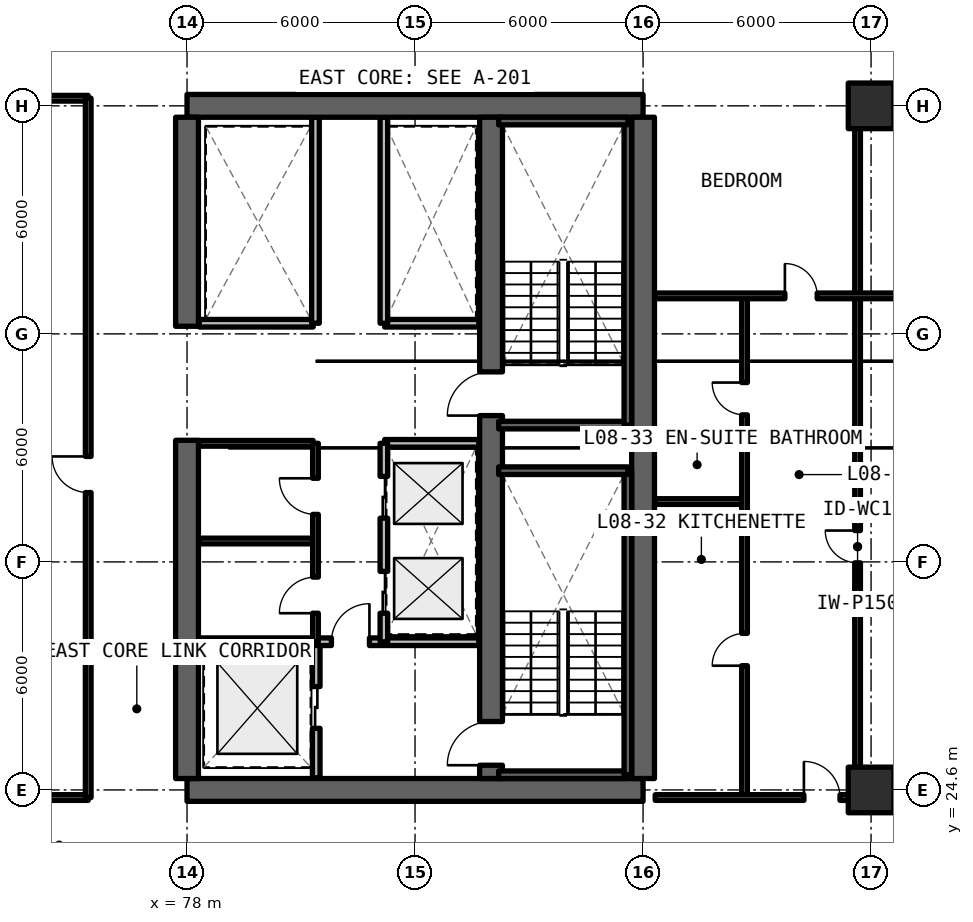
"""IFC4 building model, lengths in metres.
Left out: names, types, materials, properties, quantities, classifications, styles, units other than length and angle.
Written with IfcOpenShell. Run it as: python <this file> out.ifc"""

import sys

from ifc_helpers import new_model, si_unit, direction, frame, frame_2d, origin, origin_2d, place, context, subcontext, project, spatial, rectangle, extrude, element, fill, save


model = new_model("IFC4")
c1 = context("Model", 3, precision=1e-05, world=origin(), true_north=direction((0.0, 1.0)))
c2 = subcontext(c1, "Body", "Model", "MODEL_VIEW")
j1 = project(units=[si_unit("LENGTHUNIT", "METRE"), si_unit("PLANEANGLEUNIT", "RADIAN")], contexts=[c1])
p1 = place(None, origin())
s1 = spatial("IfcSite", under=j1, at=p1, CompositionType="ELEMENT")
p2 = place(p1, origin())
s2 = spatial("IfcBuilding", under=s1, at=p2, CompositionType="ELEMENT")
p3 = place(p2, frame((0.0, 0.0, 32.34)))
s3 = spatial("IfcBuildingStorey", under=s2, at=p3, CompositionType="ELEMENT", Elevation=32.34)
for number, where, z_axis, x_axis in (
    (1, (78.0, 24.6, 0.0), (0.0, 0.0, 1.0), (1.0, 0.0, 0.0)),
    (2, (90.0, 42.6, 0.0), (0.0, 0.0, 1.0), (-1.0, 0.0, 0.0)),
):
    element("IfcWall", number, at=place(p3, frame(where, z_axis=z_axis, x_axis=x_axis)), inside=s3, PredefinedType="SHEAR", context=c2, shape_type="SweptSolid", body=[
        extrude(rectangle(XDim=12.0, YDim=0.6, at=frame_2d((6.0, 0.0))), origin(), (0.0, 0.0, 1.0), 3.3),
    ])
p4 = place(p3, frame((90.0, 24.9, 0.0), z_axis=(0.0, 0.0, 1.0), x_axis=(0.0, 1.0, 0.0)))
e3 = element("IfcWall", 3, at=p4, inside=s3, PredefinedType="SHEAR", context=c2, shape_type="SweptSolid", body=[
    extrude(rectangle(XDim=17.4, YDim=0.6, at=frame_2d((8.7, 0.0))), origin(), (0.0, 0.0, 1.0), 3.3),
])
p5 = place(p3, frame((78.0, 24.9, 0.0), z_axis=(0.0, 0.0, 1.0), x_axis=(0.0, 1.0, 0.0)))
e4 = element("IfcWall", 4, at=p5, inside=s3, PredefinedType="SHEAR", context=c2, shape_type="SweptSolid", body=[
    extrude(rectangle(XDim=8.9, YDim=0.6, at=frame_2d((4.45, 0.0))), origin(), (0.0, 0.0, 1.0), 3.3),
])
p6 = place(p3, frame((78.0, 36.8, 0.0), z_axis=(0.0, 0.0, 1.0), x_axis=(0.0, 1.0, 0.0)))
e5 = element("IfcWall", 5, at=p6, inside=s3, PredefinedType="SHEAR", context=c2, shape_type="SweptSolid", body=[
    extrude(rectangle(XDim=5.5, YDim=0.6, at=frame_2d((2.75, 0.0))), origin(), (0.0, 0.0, 1.0), 3.3),
])
p7 = place(p3, frame((86.0, 24.9, 0.0), z_axis=(0.0, 0.0, 1.0), x_axis=(0.0, 1.0, 0.0)))
e6 = element("IfcWall", 6, at=p7, inside=s3, PredefinedType="SHEAR", context=c2, shape_type="SweptSolid", body=[
    extrude(rectangle(XDim=17.4, YDim=0.6, at=frame_2d((8.7, 0.0))), origin(), (0.0, 0.0, 1.0), 3.3),
])
p8 = place(p7, frame((0.35, 0.0, 0.0)))
e7 = element("IfcOpeningElement", 7, at=p8, cuts=e6, PredefinedType="OPENING", context=c2, shape_type="SweptSolid", body=[
    extrude(rectangle(XDim=1.15, YDim=2.15, at=frame_2d((0.575, 1.075))), frame((0.0, 0.31, 0.0), z_axis=(0.0, -1.0, 0.0), x_axis=(1.0, 0.0, 0.0)), (0.0, 0.0, 1.0), 0.62),
])
p9 = place(p7, frame((9.55, 0.0, 0.0)))
e8 = element("IfcOpeningElement", 8, at=p9, cuts=e6, PredefinedType="OPENING", context=c2, shape_type="SweptSolid", body=[
    extrude(rectangle(XDim=1.15, YDim=2.15, at=frame_2d((0.575, 1.075))), frame((0.0, 0.31, 0.0), z_axis=(0.0, -1.0, 0.0), x_axis=(1.0, 0.0, 0.0)), (0.0, 0.0, 1.0), 0.62),
])
for number, where, z_axis, x_axis in (
    (9, (96.0, 24.6, 0.0), (0.0, 0.0, 1.0), (1.0, 0.0, 0.0)),
    (10, (96.0, 42.6, 0.0), (0.0, 0.0, 1.0), (1.0, 0.0, 0.0)),
):
    element("IfcColumn", number, at=place(p3, frame(where, z_axis=z_axis, x_axis=x_axis)), inside=s3, PredefinedType="COLUMN", context=c2, shape_type="SweptSolid", body=[
        extrude(rectangle(XDim=1.2, YDim=1.2, at=origin_2d()), origin(), (0.0, 0.0, 1.0), 3.3),
    ])
p10 = place(p3, frame((81.4, 24.92, 0.0), z_axis=(0.0, 0.0, 1.0), x_axis=(0.0, 1.0, 0.0)))
e11 = element("IfcWall", 11, at=p10, inside=s3, PredefinedType="SOLIDWALL", context=c2, shape_type="SweptSolid", body=[
    extrude(rectangle(XDim=3.58, YDim=0.2, at=frame_2d((1.79, 0.0))), origin(), (0.0, 0.0, 1.0), 2.35),
])
p11 = place(p10, frame((1.3, 0.0, 0.0)))
e12 = element("IfcOpeningElement", 12, at=p11, cuts=e11, PredefinedType="OPENING", context=c2, shape_type="SweptSolid", body=[
    extrude(rectangle(XDim=1.1, YDim=2.2, at=frame_2d((0.55, 1.1))), frame((0.0, 0.11, 0.0), z_axis=(0.0, -1.0, 0.0), x_axis=(1.0, 0.0, 0.0)), (0.0, 0.0, 1.0), 0.22),
])
p12 = place(p3, frame((78.32, 28.5, 0.0), z_axis=(0.0, 0.0, 1.0), x_axis=(1.0, 0.0, 0.0)))
e13 = element("IfcWall", 13, at=p12, inside=s3, PredefinedType="SOLIDWALL", context=c2, shape_type="SweptSolid", body=[
    extrude(rectangle(XDim=7.36, YDim=0.2, at=frame_2d((3.68, 0.0))), origin(), (0.0, 0.0, 1.0), 2.35),
])
p13 = place(p12, frame((3.48, 0.0, 0.0)))
e14 = element("IfcOpeningElement", 14, at=p13, cuts=e13, PredefinedType="OPENING", context=c2, shape_type="SweptSolid", body=[
    extrude(rectangle(XDim=1.0, YDim=2.15, at=frame_2d((0.5, 1.075))), frame((0.0, 0.11, 0.0), z_axis=(0.0, -1.0, 0.0), x_axis=(1.0, 0.0, 0.0)), (0.0, 0.0, 1.0), 0.22),
])
p14 = place(p3, frame((83.2, 33.72, 0.0), z_axis=(0.0, 0.0, 1.0), x_axis=(1.0, 0.0, 0.0)))
e15 = element("IfcWall", 15, at=p14, inside=s3, PredefinedType="SOLIDWALL", context=c2, shape_type="SweptSolid", body=[
    extrude(rectangle(XDim=2.48, YDim=0.2, at=frame_2d((1.24, 0.0))), origin(), (0.0, 0.0, 1.0), 2.35),
])
p15 = place(p3, frame((83.18, 28.5, 0.0), z_axis=(0.0, 0.0, 1.0), x_axis=(0.0, 1.0, 0.0)))
e16 = element("IfcWall", 16, at=p15, inside=s3, PredefinedType="SOLIDWALL", context=c2, shape_type="SweptSolid", body=[
    extrude(rectangle(XDim=5.22, YDim=0.2, at=frame_2d((2.61, 0.0))), origin(), (0.0, 0.0, 1.0), 2.35),
])
p16 = place(p15, frame((0.75, 0.0, 0.0)))
e17 = element("IfcOpeningElement", 17, at=p16, cuts=e16, PredefinedType="OPENING", context=c2, shape_type="SweptSolid", body=[
    extrude(rectangle(XDim=1.1, YDim=2.2, at=frame_2d((0.55, 1.1))), frame((0.0, 0.11, 0.0), z_axis=(0.0, -1.0, 0.0), x_axis=(1.0, 0.0, 0.0)), (0.0, 0.0, 1.0), 0.22),
])
p17 = place(p15, frame((3.25, 0.0, 0.0)))
e18 = element("IfcOpeningElement", 18, at=p17, cuts=e16, PredefinedType="OPENING", context=c2, shape_type="SweptSolid", body=[
    extrude(rectangle(XDim=1.1, YDim=2.2, at=frame_2d((0.55, 1.1))), frame((0.0, 0.11, 0.0), z_axis=(0.0, -1.0, 0.0), x_axis=(1.0, 0.0, 0.0)), (0.0, 0.0, 1.0), 0.22),
])
for number, where, z_axis, x_axis in (
    (19, (78.32, 31.15, 0.0), (0.0, 0.0, 1.0), (1.0, 0.0, 0.0)),
    (20, (78.32, 33.72, 0.0), (0.0, 0.0, 1.0), (1.0, 0.0, 0.0)),
):
    element("IfcWall", number, at=place(p3, frame(where, z_axis=z_axis, x_axis=x_axis)), inside=s3, PredefinedType="SOLIDWALL", context=c2, shape_type="SweptSolid", body=[
        extrude(rectangle(XDim=3.0, YDim=0.15, at=frame_2d((1.5, 0.0))), origin(), (0.0, 0.0, 1.0), 2.35),
    ])
p18 = place(p3, frame((81.38, 28.5, 0.0), z_axis=(0.0, 0.0, 1.0), x_axis=(0.0, 1.0, 0.0)))
e21 = element("IfcWall", 21, at=p18, inside=s3, PredefinedType="SOLIDWALL", context=c2, shape_type="SweptSolid", body=[
    extrude(rectangle(XDim=5.22, YDim=0.15, at=frame_2d((2.61, 0.0))), origin(), (0.0, 0.0, 1.0), 2.35),
])
p19 = place(p18, frame((0.75, 0.0, 0.0)))
e22 = element("IfcOpeningElement", 22, at=p19, cuts=e21, PredefinedType="OPENING", context=c2, shape_type="SweptSolid", body=[
    extrude(rectangle(XDim=0.95, YDim=2.15, at=frame_2d((0.475, 1.075))), frame((0.0, 0.085, 0.0), z_axis=(0.0, -1.0, 0.0), x_axis=(1.0, 0.0, 0.0)), (0.0, 0.0, 1.0), 0.17),
])
p20 = place(p18, frame((3.35, 0.0, 0.0)))
e23 = element("IfcOpeningElement", 23, at=p20, cuts=e21, PredefinedType="OPENING", context=c2, shape_type="SweptSolid", body=[
    extrude(rectangle(XDim=0.95, YDim=2.15, at=frame_2d((0.475, 1.075))), frame((0.0, 0.085, 0.0), z_axis=(0.0, -1.0, 0.0), x_axis=(1.0, 0.0, 0.0)), (0.0, 0.0, 1.0), 0.17),
])
p21 = place(p3, frame((83.2, 36.88, 0.0), z_axis=(0.0, 0.0, 1.0), x_axis=(1.0, 0.0, 0.0)))
e24 = element("IfcWall", 24, at=p21, inside=s3, PredefinedType="SOLIDWALL", context=c2, shape_type="SweptSolid", body=[
    extrude(rectangle(XDim=2.48, YDim=0.2, at=frame_2d((1.24, 0.0))), origin(), (0.0, 0.0, 1.0), 2.35),
])
p22 = place(p3, frame((83.18, 36.88, 0.0), z_axis=(0.0, 0.0, 1.0), x_axis=(0.0, 1.0, 0.0)))
e25 = element("IfcWall", 25, at=p22, inside=s3, PredefinedType="SOLIDWALL", context=c2, shape_type="SweptSolid", body=[
    extrude(rectangle(XDim=5.42, YDim=0.2, at=frame_2d((2.71, 0.0))), origin(), (0.0, 0.0, 1.0), 2.35),
])
p23 = place(p3, frame((78.32, 36.88, 0.0), z_axis=(0.0, 0.0, 1.0), x_axis=(1.0, 0.0, 0.0)))
e26 = element("IfcWall", 26, at=p23, inside=s3, PredefinedType="SOLIDWALL", context=c2, shape_type="SweptSolid", body=[
    extrude(rectangle(XDim=3.0, YDim=0.2, at=frame_2d((1.5, 0.0))), origin(), (0.0, 0.0, 1.0), 2.35),
])
p24 = place(p3, frame((81.38, 36.88, 0.0), z_axis=(0.0, 0.0, 1.0), x_axis=(0.0, 1.0, 0.0)))
e27 = element("IfcWall", 27, at=p24, inside=s3, PredefinedType="SOLIDWALL", context=c2, shape_type="SweptSolid", body=[
    extrude(rectangle(XDim=5.42, YDim=0.2, at=frame_2d((2.71, 0.0))), origin(), (0.0, 0.0, 1.0), 2.35),
])
for number, where, z_axis, x_axis in (
    (28, (67.15, 24.4, 0.0), (0.0, 0.0, 1.0), (1.0, 0.0, 0.0)),
    (29, (67.15, 42.8, 0.0), (0.0, 0.0, 1.0), (1.0, 0.0, 0.0)),
):
    element("IfcWall", number, at=place(p3, frame(where, z_axis=z_axis, x_axis=x_axis)), inside=s3, PredefinedType="SOLIDWALL", context=c2, shape_type="SweptSolid", body=[
        extrude(rectangle(XDim=8.25, YDim=0.15, at=frame_2d((4.125, 0.0))), origin(), (0.0, 0.0, 1.0), 2.295),
    ])
p25 = place(p3, frame((75.4, 24.4, 0.0), z_axis=(0.0, 0.0, 1.0), x_axis=(0.0, 1.0, 0.0)))
e30 = element("IfcWall", 30, at=p25, inside=s3, PredefinedType="SOLIDWALL", context=c2, shape_type="SweptSolid", body=[
    extrude(rectangle(XDim=18.4, YDim=0.15, at=frame_2d((9.2, 0.0))), origin(), (0.0, 0.0, 1.0), 2.35),
])
p26 = place(p25, frame((8.025, 0.0, 0.0)))
e31 = element("IfcOpeningElement", 31, at=p26, cuts=e30, PredefinedType="OPENING", context=c2, shape_type="SweptSolid", body=[
    extrude(rectangle(XDim=0.95, YDim=2.15, at=frame_2d((0.475, 1.075))), frame((0.0, 0.085, 0.0), z_axis=(0.0, -1.0, 0.0), x_axis=(1.0, 0.0, 0.0)), (0.0, 0.0, 1.0), 0.17),
])
p27 = place(p3, frame((95.645, 24.4, 0.0), z_axis=(0.0, 0.0, 1.0), x_axis=(0.0, 1.0, 0.0)))
e32 = element("IfcWall", 32, at=p27, inside=s3, PredefinedType="PARTITIONING", context=c2, shape_type="SweptSolid", body=[
    extrude(rectangle(XDim=13.2, YDim=0.15, at=frame_2d((6.6, 0.0))), origin(), (0.0, 0.0, 1.0), 2.35),
])
p28 = place(p27, frame((6.175, 0.0, 0.0)))
e33 = element("IfcOpeningElement", 33, at=p28, cuts=e32, PredefinedType="OPENING", context=c2, shape_type="SweptSolid", body=[
    extrude(rectangle(XDim=0.85, YDim=2.1, at=frame_2d((0.425, 1.05))), frame((0.0, 0.085, 0.0), z_axis=(0.0, -1.0, 0.0), x_axis=(1.0, 0.0, 0.0)), (0.0, 0.0, 1.0), 0.17),
])
p29 = place(p3, frame((90.32, 32.188, 0.0), z_axis=(0.0, 0.0, 1.0), x_axis=(1.0, 0.0, 0.0)))
e34 = element("IfcWall", 34, at=p29, inside=s3, PredefinedType="PARTITIONING", context=c2, shape_type="SweptSolid", body=[
    extrude(rectangle(XDim=2.35, YDim=0.15, at=frame_2d((1.175, 0.0))), origin(), (0.0, 0.0, 1.0), 2.35),
])
p30 = place(p3, frame((92.67, 24.4, 0.0), z_axis=(0.0, 0.0, 1.0), x_axis=(0.0, 1.0, 0.0)))
e35 = element("IfcWall", 35, at=p30, inside=s3, PredefinedType="PARTITIONING", context=c2, shape_type="SweptSolid", body=[
    extrude(rectangle(XDim=13.2, YDim=0.15, at=frame_2d((6.6, 0.0))), origin(), (0.0, 0.0, 1.0), 2.35),
])
p31 = place(p30, frame((3.469, 0.0, 0.0)))
e36 = element("IfcOpeningElement", 36, at=p31, cuts=e35, PredefinedType="OPENING", context=c2, shape_type="SweptSolid", body=[
    extrude(rectangle(XDim=0.85, YDim=2.1, at=frame_2d((0.425, 1.05))), frame((0.0, 0.085, 0.0), z_axis=(0.0, -1.0, 0.0), x_axis=(1.0, 0.0, 0.0)), (0.0, 0.0, 1.0), 0.17),
])
p32 = place(p30, frame((10.069, 0.0, 0.0)))
e37 = element("IfcOpeningElement", 37, at=p32, cuts=e35, PredefinedType="OPENING", context=c2, shape_type="SweptSolid", body=[
    extrude(rectangle(XDim=0.85, YDim=2.1, at=frame_2d((0.425, 1.05))), frame((0.0, 0.085, 0.0), z_axis=(0.0, -1.0, 0.0), x_axis=(1.0, 0.0, 0.0)), (0.0, 0.0, 1.0), 0.17),
])
p33 = place(p3, frame((95.645, 37.6, 0.0), z_axis=(0.0, 0.0, 1.0), x_axis=(0.0, 1.0, 0.0)))
e38 = element("IfcWall", 38, at=p33, inside=s3, PredefinedType="PARTITIONING", context=c2, shape_type="SweptSolid", body=[
    extrude(rectangle(XDim=5.2, YDim=0.15, at=frame_2d((2.6, 0.0))), origin(), (0.0, 0.0, 1.0), 2.35),
])
p34 = place(p3, frame((90.32, 37.6, 0.0), z_axis=(0.0, 0.0, 1.0), x_axis=(1.0, 0.0, 0.0)))
e39 = element("IfcWall", 39, at=p34, inside=s3, PredefinedType="PARTITIONING", context=c2, shape_type="SweptSolid", body=[
    extrude(rectangle(XDim=10.24, YDim=0.15, at=frame_2d((5.12, 0.0))), origin(), (0.0, 0.0, 1.0), 2.35),
])
p35 = place(p34, frame((3.412, 0.0, 0.0)))
e40 = element("IfcOpeningElement", 40, at=p35, cuts=e39, PredefinedType="OPENING", context=c2, shape_type="SweptSolid", body=[
    extrude(rectangle(XDim=0.85, YDim=2.1, at=frame_2d((0.425, 1.05))), frame((0.0, 0.085, 0.0), z_axis=(0.0, -1.0, 0.0), x_axis=(1.0, 0.0, 0.0)), (0.0, 0.0, 1.0), 0.17),
])
p36 = place(p34, frame((7.357, 0.0, 0.0)))
e41 = element("IfcOpeningElement", 41, at=p36, cuts=e39, PredefinedType="OPENING", context=c2, shape_type="SweptSolid", body=[
    extrude(rectangle(XDim=0.85, YDim=2.1, at=frame_2d((0.425, 1.05))), frame((0.0, 0.085, 0.0), z_axis=(0.0, -1.0, 0.0), x_axis=(1.0, 0.0, 0.0)), (0.0, 0.0, 1.0), 0.17),
])
p37 = place(p3, frame((90.32, 24.4, 0.0), z_axis=(0.0, 0.0, 1.0), x_axis=(1.0, 0.0, 0.0)))
e42 = element("IfcWall", 42, at=p37, inside=s3, PredefinedType="SOLIDWALL", context=c2, shape_type="SweptSolid", body=[
    extrude(rectangle(XDim=10.24, YDim=0.15, at=frame_2d((5.12, 0.0))), origin(), (0.0, 0.0, 1.0), 2.295),
])
p38 = place(p37, frame((3.913, 0.0, 0.0)))
e43 = element("IfcOpeningElement", 43, at=p38, cuts=e42, PredefinedType="OPENING", context=c2, shape_type="SweptSolid", body=[
    extrude(rectangle(XDim=0.95, YDim=2.15, at=frame_2d((0.475, 1.075))), frame((0.0, 0.085, 0.0), z_axis=(0.0, -1.0, 0.0), x_axis=(1.0, 0.0, 0.0)), (0.0, 0.0, 1.0), 0.17),
])
p39 = place(p3, frame((86.2, 25.0, 0.0), z_axis=(0.0, 0.0, 1.0), x_axis=(1.0, 0.0, 0.0)))
e44 = element("IfcWall", 44, at=p39, inside=s3, PredefinedType="SOLIDWALL", context=c2, shape_type="SweptSolid", body=[
    extrude(rectangle(XDim=3.4, YDim=0.2, at=frame_2d((1.7, 0.0))), origin(), (0.0, 0.0, 1.0), 3.3),
])
p40 = place(p3, frame((89.6, 25.0, 0.0), z_axis=(0.0, 0.0, 1.0), x_axis=(0.0, 1.0, 0.0)))
e45 = element("IfcWall", 45, at=p40, inside=s3, PredefinedType="SOLIDWALL", context=c2, shape_type="SweptSolid", body=[
    extrude(rectangle(XDim=8.0, YDim=0.2, at=frame_2d((4.0, 0.0))), origin(), (0.0, 0.0, 1.0), 3.3),
])
for number, where, z_axis, x_axis in (
    (46, (89.6, 33.0, 0.0), (0.0, 0.0, 1.0), (-1.0, 0.0, 0.0)),
    (47, (86.2, 34.2, 0.0), (0.0, 0.0, 1.0), (1.0, 0.0, 0.0)),
):
    element("IfcWall", number, at=place(p3, frame(where, z_axis=z_axis, x_axis=x_axis)), inside=s3, PredefinedType="SOLIDWALL", context=c2, shape_type="SweptSolid", body=[
        extrude(rectangle(XDim=3.4, YDim=0.2, at=frame_2d((1.7, 0.0))), origin(), (0.0, 0.0, 1.0), 3.3),
    ])
p41 = place(p3, frame((89.6, 34.2, 0.0), z_axis=(0.0, 0.0, 1.0), x_axis=(0.0, 1.0, 0.0)))
e48 = element("IfcWall", 48, at=p41, inside=s3, PredefinedType="SOLIDWALL", context=c2, shape_type="SweptSolid", body=[
    extrude(rectangle(XDim=8.0, YDim=0.2, at=frame_2d((4.0, 0.0))), origin(), (0.0, 0.0, 1.0), 3.3),
])
p42 = place(p3, frame((89.6, 42.2, 0.0), z_axis=(0.0, 0.0, 1.0), x_axis=(-1.0, 0.0, 0.0)))
e49 = element("IfcWall", 49, at=p42, inside=s3, PredefinedType="SOLIDWALL", context=c2, shape_type="SweptSolid", body=[
    extrude(rectangle(XDim=3.4, YDim=0.2, at=frame_2d((1.7, 0.0))), origin(), (0.0, 0.0, 1.0), 3.3),
])
p43 = place(p11, origin())
e50 = element("IfcDoor", 50, at=p43, inside=s3, OperationType="SLIDING_TO_LEFT", PredefinedType="DOOR", context=c2, shape_type="SweptSolid", body=[
    extrude(rectangle(XDim=1.1, YDim=2.2, at=frame_2d((0.55, 1.1))), frame((0.0, 0.025, 0.0), z_axis=(0.0, -1.0, 0.0), x_axis=(1.0, 0.0, 0.0)), (0.0, 0.0, 1.0), 0.05),
])
fill(e12, e50)
p44 = place(p13, origin())
e51 = element("IfcDoor", 51, at=p44, inside=s3, OperationType="SINGLE_SWING_RIGHT", PredefinedType="DOOR", context=c2, shape_type="SweptSolid", body=[
    extrude(rectangle(XDim=1.0, YDim=2.15, at=frame_2d((0.5, 1.075))), frame((0.0, 0.025, 0.0), z_axis=(0.0, -1.0, 0.0), x_axis=(1.0, 0.0, 0.0)), (0.0, 0.0, 1.0), 0.05),
])
fill(e14, e51)
p45 = place(p16, origin())
e52 = element("IfcDoor", 52, at=p45, inside=s3, OperationType="SLIDING_TO_LEFT", PredefinedType="DOOR", context=c2, shape_type="SweptSolid", body=[
    extrude(rectangle(XDim=1.1, YDim=2.2, at=frame_2d((0.55, 1.1))), frame((0.0, 0.025, 0.0), z_axis=(0.0, -1.0, 0.0), x_axis=(1.0, 0.0, 0.0)), (0.0, 0.0, 1.0), 0.05),
])
fill(e17, e52)
p46 = place(p17, origin())
e53 = element("IfcDoor", 53, at=p46, inside=s3, OperationType="SLIDING_TO_RIGHT", PredefinedType="DOOR", context=c2, shape_type="SweptSolid", body=[
    extrude(rectangle(XDim=1.1, YDim=2.2, at=frame_2d((0.55, 1.1))), frame((0.0, 0.025, 0.0), z_axis=(0.0, -1.0, 0.0), x_axis=(1.0, 0.0, 0.0)), (0.0, 0.0, 1.0), 0.05),
])
fill(e18, e53)
p47 = place(p19, origin())
e54 = element("IfcDoor", 54, at=p47, inside=s3, OperationType="SINGLE_SWING_LEFT", PredefinedType="DOOR", context=c2, shape_type="SweptSolid", body=[
    extrude(rectangle(XDim=0.95, YDim=2.15, at=frame_2d((0.475, 1.075))), frame((0.0, 0.025, 0.0), z_axis=(0.0, -1.0, 0.0), x_axis=(1.0, 0.0, 0.0)), (0.0, 0.0, 1.0), 0.05),
])
fill(e22, e54)
p48 = place(p20, origin())
e55 = element("IfcDoor", 55, at=p48, inside=s3, OperationType="SINGLE_SWING_RIGHT", PredefinedType="DOOR", context=c2, shape_type="SweptSolid", body=[
    extrude(rectangle(XDim=0.95, YDim=2.15, at=frame_2d((0.475, 1.075))), frame((0.0, 0.025, 0.0), z_axis=(0.0, -1.0, 0.0), x_axis=(1.0, 0.0, 0.0)), (0.0, 0.0, 1.0), 0.05),
])
fill(e23, e55)
p49 = place(p26, origin())
e56 = element("IfcDoor", 56, at=p49, inside=s3, OperationType="SINGLE_SWING_RIGHT", PredefinedType="DOOR", context=c2, shape_type="SweptSolid", body=[
    extrude(rectangle(XDim=0.95, YDim=2.15, at=frame_2d((0.475, 1.075))), frame((0.0, 0.025, 0.0), z_axis=(0.0, -1.0, 0.0), x_axis=(1.0, 0.0, 0.0)), (0.0, 0.0, 1.0), 0.05),
])
fill(e31, e56)
p50 = place(p28, origin())
e57 = element("IfcDoor", 57, at=p50, inside=s3, OperationType="SINGLE_SWING_RIGHT", PredefinedType="DOOR", context=c2, shape_type="SweptSolid", body=[
    extrude(rectangle(XDim=0.85, YDim=2.1, at=frame_2d((0.425, 1.05))), frame((0.0, 0.025, 0.0), z_axis=(0.0, -1.0, 0.0), x_axis=(1.0, 0.0, 0.0)), (0.0, 0.0, 1.0), 0.05),
])
fill(e33, e57)
p51 = place(p31, origin())
e58 = element("IfcDoor", 58, at=p51, inside=s3, OperationType="SINGLE_SWING_LEFT", PredefinedType="DOOR", context=c2, shape_type="SweptSolid", body=[
    extrude(rectangle(XDim=0.85, YDim=2.1, at=frame_2d((0.425, 1.05))), frame((0.0, 0.025, 0.0), z_axis=(0.0, -1.0, 0.0), x_axis=(1.0, 0.0, 0.0)), (0.0, 0.0, 1.0), 0.05),
])
fill(e36, e58)
p52 = place(p32, origin())
e59 = element("IfcDoor", 59, at=p52, inside=s3, OperationType="SINGLE_SWING_RIGHT", PredefinedType="DOOR", context=c2, shape_type="SweptSolid", body=[
    extrude(rectangle(XDim=0.85, YDim=2.1, at=frame_2d((0.425, 1.05))), frame((0.0, 0.025, 0.0), z_axis=(0.0, -1.0, 0.0), x_axis=(1.0, 0.0, 0.0)), (0.0, 0.0, 1.0), 0.05),
])
fill(e37, e59)
p53 = place(p35, origin())
e60 = element("IfcDoor", 60, at=p53, inside=s3, OperationType="SINGLE_SWING_LEFT", PredefinedType="DOOR", context=c2, shape_type="SweptSolid", body=[
    extrude(rectangle(XDim=0.85, YDim=2.1, at=frame_2d((0.425, 1.05))), frame((0.0, 0.025, 0.0), z_axis=(0.0, -1.0, 0.0), x_axis=(1.0, 0.0, 0.0)), (0.0, 0.0, 1.0), 0.05),
])
fill(e40, e60)
p54 = place(p38, origin())
e61 = element("IfcDoor", 61, at=p54, inside=s3, OperationType="SINGLE_SWING_LEFT", PredefinedType="DOOR", context=c2, shape_type="SweptSolid", body=[
    extrude(rectangle(XDim=0.95, YDim=2.15, at=frame_2d((0.475, 1.075))), frame((0.0, 0.025, 0.0), z_axis=(0.0, -1.0, 0.0), x_axis=(1.0, 0.0, 0.0)), (0.0, 0.0, 1.0), 0.05),
])
fill(e43, e61)
p55 = place(p8, origin())
e62 = element("IfcDoor", 62, at=p55, inside=s3, OperationType="SINGLE_SWING_RIGHT", PredefinedType="DOOR", context=c2, shape_type="SweptSolid", body=[
    extrude(rectangle(XDim=1.15, YDim=2.15, at=frame_2d((0.575, 1.075))), frame((0.0, 0.025, 0.0), z_axis=(0.0, -1.0, 0.0), x_axis=(1.0, 0.0, 0.0)), (0.0, 0.0, 1.0), 0.05),
])
fill(e7, e62)
p56 = place(p9, origin())
e63 = element("IfcDoor", 63, at=p56, inside=s3, OperationType="SINGLE_SWING_LEFT", PredefinedType="DOOR", context=c2, shape_type="SweptSolid", body=[
    extrude(rectangle(XDim=1.15, YDim=2.15, at=frame_2d((0.575, 1.075))), frame((0.0, 0.025, 0.0), z_axis=(0.0, -1.0, 0.0), x_axis=(1.0, 0.0, 0.0)), (0.0, 0.0, 1.0), 0.05),
])
fill(e8, e63)
save(model, sys.argv[1])
